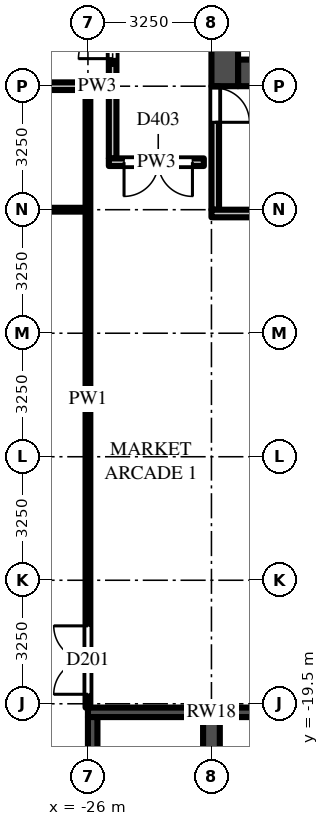
"""IFC4 building model, lengths in metres.
Left out: names, types, materials, properties, quantities, classifications, styles, units other than length and angle.
Written with IfcOpenShell. Run it as: python <this file> out.ifc"""

import sys

from ifc_helpers import new_model, si_unit, direction, frame, frame_2d, origin, place, context, subcontext, project, spatial, rectangle, extrude, source, transform, mapped, element, fill, save


model = new_model("IFC4")
c1 = context("Model", 3, precision=1e-05, world=origin(), true_north=direction((0.0, 1.0)))
c2 = subcontext(c1, "Body", "Model", "MODEL_VIEW")
j1 = project(units=[si_unit("LENGTHUNIT", "METRE"), si_unit("PLANEANGLEUNIT", "RADIAN")], contexts=[c1])
p1 = place(None, origin())
s1 = spatial("IfcSite", under=j1, at=p1, CompositionType="ELEMENT")
p2 = place(p1, origin())
s2 = spatial("IfcBuilding", under=s1, at=p2, CompositionType="ELEMENT")
p3 = place(p2, frame((0.0, 0.0, 29.0)))
s3 = spatial("IfcBuildingStorey", under=s2, at=p3, CompositionType="ELEMENT", Elevation=29.0)
m1 = source(origin(), c2, "Body", "SweptSolid", [
    extrude(rectangle(XDim=14.85, YDim=0.7, at=frame_2d((7.425, 0.0))), origin(), (0.0, 0.0, 1.0), 4.65),
])
p4 = place(p3, frame((-7.2, -2.9, 0.0), z_axis=(0.0, 0.0, 1.0), x_axis=(-1.0, 0.0, 0.0)))
e1 = element("IfcWall", 1, at=p4, inside=s3, PredefinedType="SHEAR", context=c2, shape_type="MappedRepresentation", body=[
    mapped(m1, transform((0.0, 0.0, 0.0))),
])
m2 = source(origin(), c2, "Body", "SweptSolid", [
    extrude(rectangle(XDim=1.3, YDim=2.1, at=frame_2d((0.65, 1.05))), frame((0.0, 0.36, 0.0), z_axis=(0.0, -1.0, 0.0), x_axis=(1.0, 0.0, 0.0)), (0.0, 0.0, 1.0), 0.72),
])
p5 = place(p4, frame((12.2, 0.0, 0.0)))
e2 = element("IfcOpeningElement", 2, at=p5, cuts=e1, PredefinedType="OPENING", context=c2, shape_type="MappedRepresentation", body=[
    mapped(m2, transform((0.0, 0.0, 0.0))),
])
m3 = source(origin(), c2, "Body", "SweptSolid", [
    extrude(rectangle(XDim=1.2, YDim=2.1, at=frame_2d((0.6, 1.05))), frame((0.0, 0.36, 0.0), z_axis=(0.0, -1.0, 0.0), x_axis=(1.0, 0.0, 0.0)), (0.0, 0.0, 1.0), 0.72),
])
p6 = place(p4, frame((9.85, 0.0, 0.0)))
e3 = element("IfcOpeningElement", 3, at=p6, cuts=e1, PredefinedType="OPENING", context=c2, shape_type="MappedRepresentation", body=[
    mapped(m3, transform((0.0, 0.0, 0.0))),
])
m4 = source(origin(), c2, "Body", "SweptSolid", [
    extrude(rectangle(XDim=1.0, YDim=2.1, at=frame_2d((0.5, 1.05))), frame((0.0, 0.36, 0.0), z_axis=(0.0, -1.0, 0.0), x_axis=(1.0, 0.0, 0.0)), (0.0, 0.0, 1.0), 0.72),
])
p7 = place(p4, frame((7.9, 0.0, 0.0)))
e4 = element("IfcOpeningElement", 4, at=p7, cuts=e1, PredefinedType="OPENING", context=c2, shape_type="MappedRepresentation", body=[
    mapped(m4, transform((0.0, 0.0, 0.0))),
])
m5 = source(origin(), c2, "Body", "SweptSolid", [
    extrude(rectangle(XDim=0.8, YDim=2.1, at=frame_2d((0.4, 1.05))), frame((0.0, 0.36, 0.0), z_axis=(0.0, -1.0, 0.0), x_axis=(1.0, 0.0, 0.0)), (0.0, 0.0, 1.0), 0.72),
])
p8 = place(p4, frame((0.113, 0.0, 0.0)))
e5 = element("IfcOpeningElement", 5, at=p8, cuts=e1, PredefinedType="OPENING", context=c2, shape_type="MappedRepresentation", body=[
    mapped(m5, transform((0.0, 0.0, 0.0))),
])
p9 = place(p4, frame((1.288, 0.0, 0.0)))
e6 = element("IfcOpeningElement", 6, at=p9, cuts=e1, PredefinedType="OPENING", context=c2, shape_type="MappedRepresentation", body=[
    mapped(m5, transform((0.0, 0.0, 0.0))),
])
p10 = place(p4, frame((2.712, 0.0, 0.0)))
e7 = element("IfcOpeningElement", 7, at=p10, cuts=e1, PredefinedType="OPENING", context=c2, shape_type="MappedRepresentation", body=[
    mapped(m5, transform((0.0, 0.0, 0.0))),
])
p11 = place(p4, frame((3.887, 0.0, 0.0)))
e8 = element("IfcOpeningElement", 8, at=p11, cuts=e1, PredefinedType="OPENING", context=c2, shape_type="MappedRepresentation", body=[
    mapped(m5, transform((0.0, 0.0, 0.0))),
])
p12 = place(p4, frame((5.312, 0.0, 0.0)))
e9 = element("IfcOpeningElement", 9, at=p12, cuts=e1, PredefinedType="OPENING", context=c2, shape_type="MappedRepresentation", body=[
    mapped(m5, transform((0.0, 0.0, 0.0))),
])
p13 = place(p4, frame((6.488, 0.0, 0.0)))
e10 = element("IfcOpeningElement", 10, at=p13, cuts=e1, PredefinedType="OPENING", context=c2, shape_type="MappedRepresentation", body=[
    mapped(m5, transform((0.0, 0.0, 0.0))),
])
m6 = source(origin(), c2, "Body", "SweptSolid", [
    extrude(rectangle(XDim=9.05, YDim=0.7, at=frame_2d((4.525, 0.0))), origin(), (0.0, 0.0, 1.0), 4.65),
])
p14 = place(p3, frame((-22.4, 5.8, 0.0), z_axis=(0.0, 0.0, 1.0), x_axis=(0.0, -1.0, 0.0)))
e11 = element("IfcWall", 11, at=p14, inside=s3, PredefinedType="SHEAR", context=c2, shape_type="MappedRepresentation", body=[
    mapped(m6, transform((0.0, 0.0, 0.0))),
])
m7 = source(origin(), c2, "Body", "SweptSolid", [
    extrude(rectangle(XDim=3.25, YDim=0.2, at=frame_2d((1.625, 0.0))), origin(), (0.0, 0.0, 1.0), 4.65),
])
p15 = place(p3, frame((-22.65, -3.25, 0.0), z_axis=(0.0, 0.0, 1.0), x_axis=(0.0, -1.0, 0.0)))
e12 = element("IfcWall", 12, at=p15, inside=s3, PredefinedType="PARTITIONING", context=c2, shape_type="MappedRepresentation", body=[
    mapped(m7, transform((0.0, 0.0, 0.0))),
])
m8 = source(origin(), c2, "Body", "SweptSolid", [
    extrude(rectangle(XDim=0.9, YDim=2.1, at=frame_2d((0.45, 1.05))), frame((0.0, 0.11, 0.0), z_axis=(0.0, -1.0, 0.0), x_axis=(1.0, 0.0, 0.0)), (0.0, 0.0, 1.0), 0.22),
])
p16 = place(p15, frame((0.05, 0.0, 0.0)))
e13 = element("IfcOpeningElement", 13, at=p16, cuts=e12, PredefinedType="OPENING", context=c2, shape_type="MappedRepresentation", body=[
    mapped(m8, transform((0.0, 0.0, 0.0))),
])
m9 = source(origin(), c2, "Body", "SweptSolid", [
    extrude(rectangle(XDim=6.15, YDim=0.2, at=frame_2d((3.075, 0.0))), origin(), (0.0, 0.0, 1.0), 4.65),
])
p17 = place(p3, frame((-16.6, -6.6, 0.0), z_axis=(0.0, 0.0, 1.0), x_axis=(-1.0, 0.0, 0.0)))
e14 = element("IfcWall", 14, at=p17, inside=s3, PredefinedType="PARTITIONING", context=c2, shape_type="MappedRepresentation", body=[
    mapped(m9, transform((0.0, 0.0, 0.0))),
])
m10 = source(origin(), c2, "Body", "SweptSolid", [
    extrude(rectangle(XDim=6.5, YDim=0.25, at=frame_2d((3.25, 0.0))), origin(), (0.0, 0.0, 1.0), 4.65),
])
p18 = place(p3, frame((-26.0, -19.725, 0.0), z_axis=(0.0, 0.0, 1.0), x_axis=(1.0, 0.0, 0.0)))
e15 = element("IfcWall", 15, at=p18, inside=s3, PredefinedType="SHEAR", context=c2, shape_type="MappedRepresentation", body=[
    mapped(m10, transform((0.0, 0.0, 0.0))),
])
m11 = source(origin(), c2, "Body", "SweptSolid", [
    extrude(rectangle(XDim=8.3, YDim=0.25, at=frame_2d((4.15, 0.0))), origin(), (0.0, 0.0, 1.0), 4.65),
])
p19 = place(p3, frame((-25.875, -28.15, 0.0), z_axis=(0.0, 0.0, 1.0), x_axis=(0.0, 1.0, 0.0)))
e16 = element("IfcWall", 16, at=p19, inside=s3, PredefinedType="SHEAR", context=c2, shape_type="MappedRepresentation", body=[
    mapped(m11, transform((0.0, 0.0, 0.0))),
])
m12 = source(origin(), c2, "Body", "SweptSolid", [
    extrude(rectangle(XDim=8.3, YDim=0.44, at=frame_2d((4.15, 0.0))), origin(), (0.0, 0.0, 1.0), 4.65),
])
p20 = place(p3, frame((-22.75, -28.15, 0.0), z_axis=(0.0, 0.0, 1.0), x_axis=(0.0, 1.0, 0.0)))
e17 = element("IfcWall", 17, at=p20, inside=s3, PredefinedType="SHEAR", context=c2, shape_type="MappedRepresentation", body=[
    mapped(m12, transform((0.0, 0.0, 0.0))),
])
m13 = source(origin(), c2, "Body", "SweptSolid", [
    extrude(rectangle(XDim=16.25, YDim=0.125, at=frame_2d((8.125, 0.0))), origin(), (0.0, 0.0, 1.0), 2.83),
])
p21 = place(p3, frame((-26.0, -19.6, 0.0), z_axis=(0.0, 0.0, 1.0), x_axis=(0.0, 1.0, 0.0)))
e18 = element("IfcWall", 18, at=p21, inside=s3, PredefinedType="PARTITIONING", context=c2, shape_type="MappedRepresentation", body=[
    mapped(m13, transform((0.0, 0.0, 0.0))),
])
m14 = source(origin(), c2, "Body", "SweptSolid", [
    extrude(rectangle(XDim=1.8, YDim=2.1, at=frame_2d((0.9, 1.05))), frame((0.0, 0.073, 0.0), z_axis=(0.0, -1.0, 0.0), x_axis=(1.0, 0.0, 0.0)), (0.0, 0.0, 1.0), 0.145),
])
p22 = place(p21, frame((0.35, 0.0, 0.0)))
e19 = element("IfcOpeningElement", 19, at=p22, cuts=e18, PredefinedType="OPENING", context=c2, shape_type="MappedRepresentation", body=[
    mapped(m14, transform((0.0, 0.0, 0.0))),
])
m15 = source(origin(), c2, "Body", "SweptSolid", [
    extrude(rectangle(XDim=5.05, YDim=0.2, at=frame_2d((2.525, 0.0))), origin(), (0.0, 0.0, 1.0), 2.83),
])
p23 = place(p3, frame((-25.35, -5.15, 0.0), z_axis=(0.0, 0.0, 1.0), x_axis=(0.0, 1.0, 0.0)))
e20 = element("IfcWall", 20, at=p23, inside=s3, PredefinedType="PARTITIONING", context=c2, shape_type="MappedRepresentation", body=[
    mapped(m15, transform((0.0, 0.0, 0.0))),
])
m16 = source(origin(), c2, "Body", "SweptSolid", [
    extrude(rectangle(XDim=1.8, YDim=2.1, at=frame_2d((0.9, 1.05))), frame((0.0, 0.11, 0.0), z_axis=(0.0, -1.0, 0.0), x_axis=(1.0, 0.0, 0.0)), (0.0, 0.0, 1.0), 0.22),
])
p24 = place(p23, frame((2.625, 0.0, 0.0)))
e21 = element("IfcOpeningElement", 21, at=p24, cuts=e20, PredefinedType="OPENING", context=c2, shape_type="MappedRepresentation", body=[
    mapped(m16, transform((0.0, 0.0, 0.0))),
])
m17 = source(origin(), c2, "Body", "SweptSolid", [
    extrude(rectangle(XDim=6.238, YDim=0.1, at=frame_2d((3.119, 0.0))), origin(), (0.0, 0.0, 1.0), 3.73),
])
p25 = place(p3, frame((-32.3, -6.5, 0.0), z_axis=(0.0, 0.0, 1.0), x_axis=(1.0, 0.0, 0.0)))
e22 = element("IfcWall", 22, at=p25, inside=s3, PredefinedType="PARTITIONING", context=c2, shape_type="MappedRepresentation", body=[
    mapped(m17, transform((0.0, 0.0, 0.0))),
])
m18 = source(origin(), c2, "Body", "SweptSolid", [
    extrude(rectangle(XDim=2.5, YDim=0.2, at=frame_2d((1.25, 0.0))), origin(), (0.0, 0.0, 1.0), 2.83),
])
p26 = place(p3, frame((-22.95, -5.25, 0.0), z_axis=(0.0, 0.0, 1.0), x_axis=(-1.0, 0.0, 0.0)))
e23 = element("IfcWall", 23, at=p26, inside=s3, PredefinedType="PARTITIONING", context=c2, shape_type="MappedRepresentation", body=[
    mapped(m18, transform((0.0, 0.0, 0.0))),
])
p27 = place(p26, frame((0.3, 0.0, 0.0)))
e24 = element("IfcOpeningElement", 24, at=p27, cuts=e23, PredefinedType="OPENING", context=c2, shape_type="MappedRepresentation", body=[
    mapped(m16, transform((0.0, 0.0, 0.0))),
])
m19 = source(origin(), c2, "Body", "SweptSolid", [
    extrude(rectangle(XDim=0.613, YDim=0.2, at=frame_2d((0.306, 0.0))), origin(), (0.0, 0.0, 1.0), 4.65),
])
p28 = place(p3, frame((-26.062, -3.25, 0.0), z_axis=(0.0, 0.0, 1.0), x_axis=(1.0, 0.0, 0.0)))
e25 = element("IfcWall", 25, at=p28, inside=s3, PredefinedType="PARTITIONING", context=c2, shape_type="MappedRepresentation", body=[
    mapped(m19, transform((0.0, 0.0, 0.0))),
])
m20 = source(origin(), c2, "Body", "SweptSolid", [
    extrude(rectangle(XDim=6.363, YDim=0.2, at=frame_2d((3.181, 0.0))), origin(), (0.0, 0.0, 1.0), 3.23),
])
p29 = place(p3, frame((-25.938, -3.25, 0.0), z_axis=(0.0, 0.0, 1.0), x_axis=(-1.0, 0.0, 0.0)))
e26 = element("IfcWall", 26, at=p29, inside=s3, PredefinedType="PARTITIONING", context=c2, shape_type="MappedRepresentation", body=[
    mapped(m20, transform((0.0, 0.0, 0.0))),
])
m21 = source(origin(), c2, "Body", "SweptSolid", [
    extrude(rectangle(XDim=1.0, YDim=2.1, at=frame_2d((0.5, 1.05))), frame((0.0, 0.11, 0.0), z_axis=(0.0, -1.0, 0.0), x_axis=(1.0, 0.0, 0.0)), (0.0, 0.0, 1.0), 0.22),
])
p30 = place(p29, frame((5.212, 0.0, 0.0)))
e27 = element("IfcOpeningElement", 27, at=p30, cuts=e26, PredefinedType="OPENING", context=c2, shape_type="MappedRepresentation", body=[
    mapped(m21, transform((0.0, 0.0, 0.0))),
])
m22 = source(origin(), c2, "Body", "SweptSolid", [
    extrude(rectangle(XDim=0.9, YDim=2.1, at=frame_2d((0.45, 1.05))), frame((0.0, 0.025, 0.0), z_axis=(0.0, -1.0, 0.0), x_axis=(1.0, 0.0, 0.0)), (0.0, 0.0, 1.0), 0.05),
])
p31 = place(p16, origin())
e28 = element("IfcDoor", 28, at=p31, inside=s3, OperationType="SINGLE_SWING_RIGHT", PredefinedType="DOOR", context=c2, shape_type="MappedRepresentation", body=[
    mapped(m22, transform((0.0, 0.0, 0.0))),
])
fill(e13, e28)
m23 = source(origin(), c2, "Body", "SweptSolid", [
    extrude(rectangle(XDim=1.8, YDim=2.1, at=frame_2d((0.9, 1.05))), frame((0.0, 0.025, 0.0), z_axis=(0.0, -1.0, 0.0), x_axis=(1.0, 0.0, 0.0)), (0.0, 0.0, 1.0), 0.05),
])
p32 = place(p22, origin())
e29 = element("IfcDoor", 29, at=p32, inside=s3, OperationType="DOUBLE_DOOR_SINGLE_SWING", PredefinedType="DOOR", context=c2, shape_type="MappedRepresentation", body=[
    mapped(m23, transform((0.0, 0.0, 0.0))),
])
fill(e19, e29)
p33 = place(p27, origin())
e30 = element("IfcDoor", 30, at=p33, inside=s3, OperationType="DOUBLE_DOOR_SINGLE_SWING", PredefinedType="DOOR", context=c2, shape_type="MappedRepresentation", body=[
    mapped(m23, transform((0.0, 0.0, 0.0))),
])
fill(e24, e30)
p34 = place(p24, origin())
e31 = element("IfcDoor", 31, at=p34, inside=s3, OperationType="DOUBLE_DOOR_SINGLE_SWING", PredefinedType="DOOR", context=c2, shape_type="MappedRepresentation", body=[
    mapped(m23, transform((0.0, 0.0, 0.0))),
])
fill(e21, e31)
save(model, sys.argv[1])
